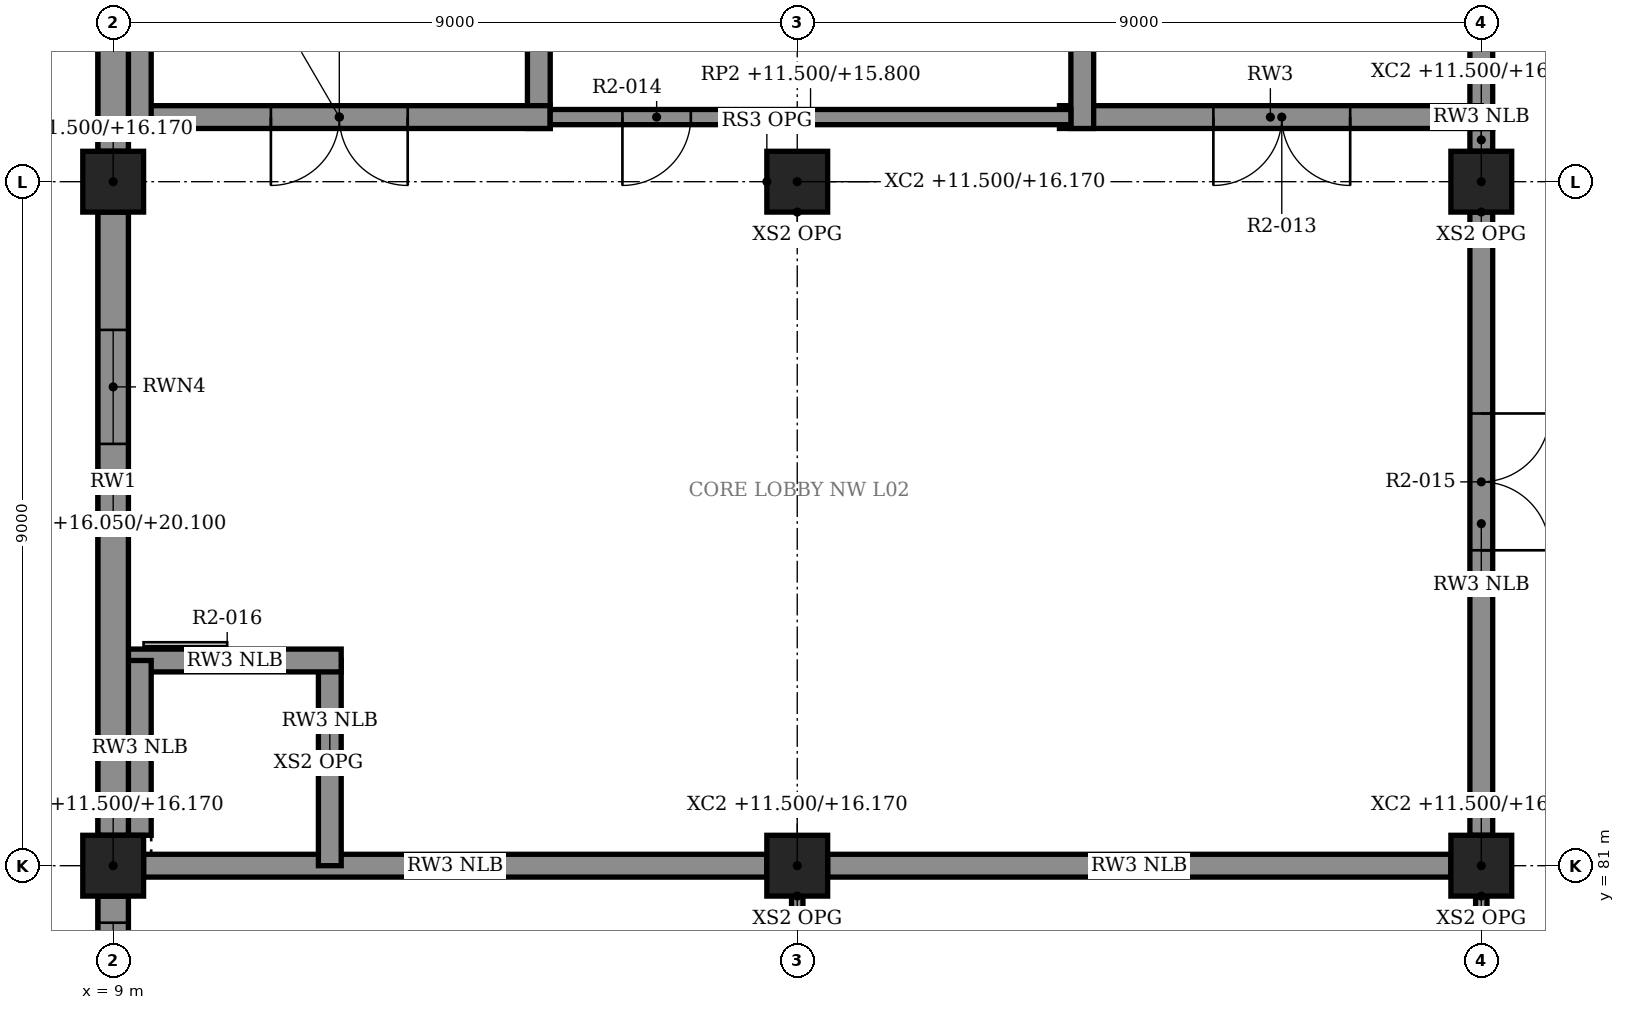
"""IFC4 building model, lengths in metres.
Left out: names, types, materials, properties, quantities, classifications, styles, units other than length and angle.
Written with IfcOpenShell. Run it as: python <this file> out.ifc"""

import sys

from ifc_helpers import new_model, si_unit, direction, frame, frame_2d, origin, origin_2d, place, context, subcontext, project, spatial, rectangle, extrude, element, fill, save


model = new_model("IFC4")
c1 = context("Model", 3, precision=1e-05, world=origin(), true_north=direction((0.0, 1.0)))
c2 = subcontext(c1, "Body", "Model", "MODEL_VIEW")
j1 = project(units=[si_unit("LENGTHUNIT", "METRE"), si_unit("PLANEANGLEUNIT", "RADIAN")], contexts=[c1])
p1 = place(None, origin())
s1 = spatial("IfcSite", under=j1, at=p1, CompositionType="ELEMENT")
p2 = place(p1, origin())
s2 = spatial("IfcBuilding", under=s1, at=p2, CompositionType="ELEMENT")
p3 = place(p2, frame((0.0, 0.0, 11.5)))
s3 = spatial("IfcBuildingStorey", under=s2, at=p3, CompositionType="ELEMENT", Elevation=11.5)
for number, where, z_axis, x_axis in (
    (1, (9.0, 81.0, 0.0), (0.0, 0.0, 1.0), (1.0, 0.0, 0.0)),
    (2, (9.0, 90.0, 0.0), (0.0, 0.0, 1.0), (1.0, 0.0, 0.0)),
    (3, (18.0, 81.0, 0.0), (0.0, 0.0, 1.0), (1.0, 0.0, 0.0)),
    (4, (18.0, 90.0, 0.0), (0.0, 0.0, 1.0), (1.0, 0.0, 0.0)),
    (5, (27.0, 81.0, 0.0), (0.0, 0.0, 1.0), (1.0, 0.0, 0.0)),
    (6, (27.0, 90.0, 0.0), (0.0, 0.0, 1.0), (1.0, 0.0, 0.0)),
):
    element("IfcColumn", number, at=place(p3, frame(where, z_axis=z_axis, x_axis=x_axis)), inside=s3, PredefinedType="COLUMN", context=c2, shape_type="SweptSolid", body=[
        extrude(rectangle(XDim=0.8, YDim=0.8, at=origin_2d()), origin(), (0.0, 0.0, 1.0), 4.67),
    ])
for number, where, z_axis, x_axis in (
    (7, (9.0, 72.0, 4.55), (0.0, 0.0, 1.0), (0.0, 1.0, 0.0)),
    (8, (9.0, 81.0, 4.55), (0.0, 0.0, 1.0), (0.0, 1.0, 0.0)),
    (9, (9.0, 90.0, 4.55), (0.0, 0.0, 1.0), (0.0, 1.0, 0.0)),
):
    element("IfcWall", number, at=place(p3, frame(where, z_axis=z_axis, x_axis=x_axis)), inside=s3, PredefinedType="SOLIDWALL", context=c2, shape_type="SweptSolid", body=[
        extrude(rectangle(XDim=9.0, YDim=0.4, at=frame_2d((4.5, 0.0))), origin(), (0.0, 0.0, 1.0), 4.05),
    ])
p4 = place(p3, frame((9.0, 72.4, 0.0), z_axis=(0.0, 0.0, 1.0), x_axis=(0.0, 1.0, 0.0)))
e10 = element("IfcWall", 10, at=p4, inside=s3, PredefinedType="SOLIDWALL", context=c2, shape_type="SweptSolid", body=[
    extrude(rectangle(XDim=8.2, YDim=0.4, at=frame_2d((4.1, 0.0))), origin(), (0.0, 0.0, 1.0), 4.55),
])
p5 = place(p4, frame((0.35, 0.0, 0.9)))
e11 = element("IfcOpeningElement", 11, at=p5, cuts=e10, PredefinedType="OPENING", context=c2, shape_type="SweptSolid", body=[
    extrude(rectangle(XDim=1.5, YDim=2.4, at=frame_2d((0.75, 1.2))), frame((0.0, 0.21, 0.0), z_axis=(0.0, -1.0, 0.0), x_axis=(1.0, 0.0, 0.0)), (0.0, 0.0, 1.0), 0.42),
])
p6 = place(p4, frame((3.35, 0.0, 0.9)))
e12 = element("IfcOpeningElement", 12, at=p6, cuts=e10, PredefinedType="OPENING", context=c2, shape_type="SweptSolid", body=[
    extrude(rectangle(XDim=1.5, YDim=2.4, at=frame_2d((0.75, 1.2))), frame((0.0, 0.21, 0.0), z_axis=(0.0, -1.0, 0.0), x_axis=(1.0, 0.0, 0.0)), (0.0, 0.0, 1.0), 0.42),
])
p7 = place(p4, frame((6.35, 0.0, 0.9)))
e13 = element("IfcOpeningElement", 13, at=p7, cuts=e10, PredefinedType="OPENING", context=c2, shape_type="SweptSolid", body=[
    extrude(rectangle(XDim=1.5, YDim=2.4, at=frame_2d((0.75, 1.2))), frame((0.0, 0.21, 0.0), z_axis=(0.0, -1.0, 0.0), x_axis=(1.0, 0.0, 0.0)), (0.0, 0.0, 1.0), 0.42),
])
p8 = place(p3, frame((9.0, 81.4, 0.0), z_axis=(0.0, 0.0, 1.0), x_axis=(0.0, 1.0, 0.0)))
e14 = element("IfcWall", 14, at=p8, inside=s3, PredefinedType="SOLIDWALL", context=c2, shape_type="SweptSolid", body=[
    extrude(rectangle(XDim=8.2, YDim=0.4, at=frame_2d((4.1, 0.0))), origin(), (0.0, 0.0, 1.0), 4.55),
])
p9 = place(p8, frame((5.15, 0.0, 1.2)))
e15 = element("IfcOpeningElement", 15, at=p9, cuts=e14, PredefinedType="OPENING", context=c2, shape_type="SweptSolid", body=[
    extrude(rectangle(XDim=1.5, YDim=1.8, at=frame_2d((0.75, 0.9))), frame((0.0, 0.21, 0.0), z_axis=(0.0, -1.0, 0.0), x_axis=(1.0, 0.0, 0.0)), (0.0, 0.0, 1.0), 0.42),
])
p10 = place(p3, frame((9.0, 90.4, 0.0), z_axis=(0.0, 0.0, 1.0), x_axis=(0.0, 1.0, 0.0)))
e16 = element("IfcWall", 16, at=p10, inside=s3, PredefinedType="SOLIDWALL", context=c2, shape_type="SweptSolid", body=[
    extrude(rectangle(XDim=8.2, YDim=0.4, at=frame_2d((4.1, 0.0))), origin(), (0.0, 0.0, 1.0), 4.55),
])
p11 = place(p3, frame((9.2, 90.85, 0.0), z_axis=(0.0, 0.0, 1.0), x_axis=(1.0, 0.0, 0.0)))
e17 = element("IfcWall", 17, at=p11, inside=s3, PredefinedType="SOLIDWALL", context=c2, shape_type="SweptSolid", body=[
    extrude(rectangle(XDim=5.55, YDim=0.3, at=frame_2d((2.775, 0.0))), origin(), (0.0, 0.0, 1.0), 4.3),
])
p12 = place(p11, frame((1.875, 0.0, 0.0)))
e18 = element("IfcOpeningElement", 18, at=p12, cuts=e17, PredefinedType="OPENING", context=c2, shape_type="SweptSolid", body=[
    extrude(rectangle(XDim=1.8, YDim=2.4, at=frame_2d((0.9, 1.2))), frame((0.0, 0.16, 0.0), z_axis=(0.0, -1.0, 0.0), x_axis=(1.0, 0.0, 0.0)), (0.0, 0.0, 1.0), 0.32),
])
p13 = place(p3, frame((9.35, 98.6, 0.0), z_axis=(0.0, 0.0, 1.0), x_axis=(0.0, -1.0, 0.0)))
e19 = element("IfcWall", 19, at=p13, inside=s3, PredefinedType="SOLIDWALL", context=c2, shape_type="SweptSolid", body=[
    extrude(rectangle(XDim=7.9, YDim=0.3, at=frame_2d((3.95, 0.0))), origin(), (0.0, 0.0, 1.0), 4.3),
])
p14 = place(p3, frame((14.6, 98.8, 0.0), z_axis=(0.0, 0.0, 1.0), x_axis=(0.0, -1.0, 0.0)))
e20 = element("IfcWall", 20, at=p14, inside=s3, PredefinedType="SOLIDWALL", context=c2, shape_type="SweptSolid", body=[
    extrude(rectangle(XDim=8.1, YDim=0.3, at=frame_2d((4.05, 0.0))), origin(), (0.0, 0.0, 1.0), 4.3),
])
p15 = place(p3, frame((21.45, 90.85, 0.0), z_axis=(0.0, 0.0, 1.0), x_axis=(1.0, 0.0, 0.0)))
e21 = element("IfcWall", 21, at=p15, inside=s3, PredefinedType="SOLIDWALL", context=c2, shape_type="SweptSolid", body=[
    extrude(rectangle(XDim=5.55, YDim=0.3, at=frame_2d((2.775, 0.0))), origin(), (0.0, 0.0, 1.0), 4.3),
])
p16 = place(p15, frame((2.025, 0.0, 0.0)))
e22 = element("IfcOpeningElement", 22, at=p16, cuts=e21, PredefinedType="OPENING", context=c2, shape_type="SweptSolid", body=[
    extrude(rectangle(XDim=1.8, YDim=2.4, at=frame_2d((0.9, 1.2))), frame((0.0, 0.16, 0.0), z_axis=(0.0, -1.0, 0.0), x_axis=(1.0, 0.0, 0.0)), (0.0, 0.0, 1.0), 0.32),
])
p17 = place(p3, frame((21.75, 98.8, 0.0), z_axis=(0.0, 0.0, 1.0), x_axis=(0.0, -1.0, 0.0)))
e23 = element("IfcWall", 23, at=p17, inside=s3, PredefinedType="SOLIDWALL", context=c2, shape_type="SweptSolid", body=[
    extrude(rectangle(XDim=8.1, YDim=0.3, at=frame_2d((4.05, 0.0))), origin(), (0.0, 0.0, 1.0), 4.3),
])
p18 = place(p3, frame((27.0, 98.6, 0.0), z_axis=(0.0, 0.0, 1.0), x_axis=(0.0, -1.0, 0.0)))
e24 = element("IfcWall", 24, at=p18, inside=s3, PredefinedType="SOLIDWALL", context=c2, shape_type="SweptSolid", body=[
    extrude(rectangle(XDim=7.9, YDim=0.3, at=frame_2d((3.95, 0.0))), origin(), (0.0, 0.0, 1.0), 4.3),
])
p19 = place(p3, frame((14.75, 90.85, 0.0), z_axis=(0.0, 0.0, 1.0), x_axis=(1.0, 0.0, 0.0)))
e25 = element("IfcWall", 25, at=p19, inside=s3, PredefinedType="PARTITIONING", context=c2, shape_type="SweptSolid", body=[
    extrude(rectangle(XDim=6.85, YDim=0.2, at=frame_2d((3.425, 0.0))), origin(), (0.0, 0.0, 1.0), 4.3),
])
p20 = place(p19, frame((0.95, 0.0, 0.0)))
e26 = element("IfcOpeningElement", 26, at=p20, cuts=e25, PredefinedType="OPENING", context=c2, shape_type="SweptSolid", body=[
    extrude(rectangle(XDim=0.9, YDim=2.1, at=frame_2d((0.45, 1.05))), frame((0.0, 0.11, 0.0), z_axis=(0.0, -1.0, 0.0), x_axis=(1.0, 0.0, 0.0)), (0.0, 0.0, 1.0), 0.22),
])
for number, where, z_axis, x_axis in (
    (27, (9.4, 81.0, 0.0), (0.0, 0.0, 1.0), (1.0, 0.0, 0.0)),
    (28, (18.4, 81.0, 0.0), (0.0, 0.0, 1.0), (1.0, 0.0, 0.0)),
):
    element("IfcWall", number, at=place(p3, frame(where, z_axis=z_axis, x_axis=x_axis)), inside=s3, PredefinedType="SOLIDWALL", context=c2, shape_type="SweptSolid", body=[
        extrude(rectangle(XDim=8.2, YDim=0.3, at=frame_2d((4.1, 0.0))), origin(), (0.0, 0.0, 1.0), 4.3),
    ])
p21 = place(p3, frame((27.0, 89.6, 0.0), z_axis=(0.0, 0.0, 1.0), x_axis=(0.0, -1.0, 0.0)))
e29 = element("IfcWall", 29, at=p21, inside=s3, PredefinedType="SOLIDWALL", context=c2, shape_type="SweptSolid", body=[
    extrude(rectangle(XDim=8.2, YDim=0.3, at=frame_2d((4.1, 0.0))), origin(), (0.0, 0.0, 1.0), 4.3),
])
p22 = place(p21, frame((2.65, 0.0, 0.0)))
e30 = element("IfcOpeningElement", 30, at=p22, cuts=e29, PredefinedType="OPENING", context=c2, shape_type="SweptSolid", body=[
    extrude(rectangle(XDim=1.8, YDim=2.4, at=frame_2d((0.9, 1.2))), frame((0.0, 0.16, 0.0), z_axis=(0.0, -1.0, 0.0), x_axis=(1.0, 0.0, 0.0)), (0.0, 0.0, 1.0), 0.32),
])
p23 = place(p3, frame((27.0, 90.7, 0.0), z_axis=(0.0, 0.0, 1.0), x_axis=(0.0, -1.0, 0.0)))
e31 = element("IfcWall", 31, at=p23, inside=s3, PredefinedType="SOLIDWALL", context=c2, shape_type="SweptSolid", body=[
    extrude(rectangle(XDim=0.3, YDim=0.3, at=frame_2d((0.15, 0.0))), origin(), (0.0, 0.0, 1.0), 4.3),
])
p24 = place(p3, frame((9.2, 83.7, 0.0), z_axis=(0.0, 0.0, 1.0), x_axis=(1.0, 0.0, 0.0)))
e32 = element("IfcWall", 32, at=p24, inside=s3, PredefinedType="SOLIDWALL", context=c2, shape_type="SweptSolid", body=[
    extrude(rectangle(XDim=2.8, YDim=0.3, at=frame_2d((1.4, 0.0))), origin(), (0.0, 0.0, 1.0), 4.3),
])
p25 = place(p24, frame((0.75, 0.0, 0.0)))
e33 = element("IfcOpeningElement", 33, at=p25, cuts=e32, PredefinedType="OPENING", context=c2, shape_type="SweptSolid", body=[
    extrude(rectangle(XDim=1.1, YDim=2.4, at=frame_2d((0.55, 1.2))), frame((0.0, 0.16, 0.0), z_axis=(0.0, -1.0, 0.0), x_axis=(1.0, 0.0, 0.0)), (0.0, 0.0, 1.0), 0.32),
])
p26 = place(p3, frame((11.85, 83.7, 0.0), z_axis=(0.0, 0.0, 1.0), x_axis=(0.0, -1.0, 0.0)))
e34 = element("IfcWall", 34, at=p26, inside=s3, PredefinedType="SOLIDWALL", context=c2, shape_type="SweptSolid", body=[
    extrude(rectangle(XDim=2.7, YDim=0.3, at=frame_2d((1.35, 0.0))), origin(), (0.0, 0.0, 1.0), 4.3),
])
p27 = place(p3, frame((9.35, 83.7, 0.0), z_axis=(0.0, 0.0, 1.0), x_axis=(0.0, -1.0, 0.0)))
e35 = element("IfcWall", 35, at=p27, inside=s3, PredefinedType="SOLIDWALL", context=c2, shape_type="SweptSolid", body=[
    extrude(rectangle(XDim=2.3, YDim=0.3, at=frame_2d((1.15, 0.0))), origin(), (0.0, 0.0, 1.0), 4.3),
])
for number, where, z_axis, x_axis in (
    (36, (18.0, 72.4, 0.0), (0.0, 0.0, 1.0), (0.0, 1.0, 0.0)),
    (37, (27.0, 72.4, 0.0), (0.0, 0.0, 1.0), (0.0, 1.0, 0.0)),
):
    element("IfcWall", number, at=place(p3, frame(where, z_axis=z_axis, x_axis=x_axis)), inside=s3, PredefinedType="PARTITIONING", context=c2, shape_type="SweptSolid", body=[
        extrude(rectangle(XDim=8.2, YDim=0.15, at=frame_2d((4.1, 0.0))), origin(), (0.0, 0.0, 1.0), 4.55),
    ])
p28 = place(p7, origin())
e38 = element("IfcWindow", 38, at=p28, inside=s3, PartitioningType="SINGLE_PANEL", PredefinedType="WINDOW", context=c2, shape_type="SweptSolid", body=[
    extrude(rectangle(XDim=1.5, YDim=2.4, at=frame_2d((0.75, 1.2))), frame((0.0, 0.03, 0.0), z_axis=(0.0, -1.0, 0.0), x_axis=(1.0, 0.0, 0.0)), (0.0, 0.0, 1.0), 0.06),
])
fill(e13, e38)
p29 = place(p9, origin())
e39 = element("IfcWindow", 39, at=p29, inside=s3, PartitioningType="SINGLE_PANEL", PredefinedType="WINDOW", context=c2, shape_type="SweptSolid", body=[
    extrude(rectangle(XDim=1.5, YDim=1.8, at=frame_2d((0.75, 0.9))), frame((0.0, 0.03, 0.0), z_axis=(0.0, -1.0, 0.0), x_axis=(1.0, 0.0, 0.0)), (0.0, 0.0, 1.0), 0.06),
])
fill(e15, e39)
p30 = place(p12, frame((1.8, 0.0, 0.0), z_axis=(0.0, 0.0, 1.0), x_axis=(-1.0, 0.0, 0.0)))
e40 = element("IfcDoor", 40, at=p30, inside=s3, OperationType="DOUBLE_DOOR_SINGLE_SWING", PredefinedType="DOOR", context=c2, shape_type="SweptSolid", body=[
    extrude(rectangle(XDim=1.8, YDim=2.4, at=frame_2d((0.9, 1.2))), frame((0.0, 0.025, 0.0), z_axis=(0.0, -1.0, 0.0), x_axis=(1.0, 0.0, 0.0)), (0.0, 0.0, 1.0), 0.05),
])
fill(e18, e40)
p31 = place(p16, frame((1.8, 0.0, 0.0), z_axis=(0.0, 0.0, 1.0), x_axis=(-1.0, 0.0, 0.0)))
e41 = element("IfcDoor", 41, at=p31, inside=s3, OperationType="DOUBLE_DOOR_SINGLE_SWING", PredefinedType="DOOR", context=c2, shape_type="SweptSolid", body=[
    extrude(rectangle(XDim=1.8, YDim=2.4, at=frame_2d((0.9, 1.2))), frame((0.0, 0.025, 0.0), z_axis=(0.0, -1.0, 0.0), x_axis=(1.0, 0.0, 0.0)), (0.0, 0.0, 1.0), 0.05),
])
fill(e22, e41)
p32 = place(p20, frame((0.9, 0.0, 0.0), z_axis=(0.0, 0.0, 1.0), x_axis=(-1.0, 0.0, 0.0)))
e42 = element("IfcDoor", 42, at=p32, inside=s3, OperationType="SINGLE_SWING_LEFT", PredefinedType="DOOR", context=c2, shape_type="SweptSolid", body=[
    extrude(rectangle(XDim=0.9, YDim=2.1, at=frame_2d((0.45, 1.05))), frame((0.0, 0.025, 0.0), z_axis=(0.0, -1.0, 0.0), x_axis=(1.0, 0.0, 0.0)), (0.0, 0.0, 1.0), 0.05),
])
fill(e26, e42)
p33 = place(p22, origin())
e43 = element("IfcDoor", 43, at=p33, inside=s3, OperationType="DOUBLE_DOOR_SINGLE_SWING", PredefinedType="DOOR", context=c2, shape_type="SweptSolid", body=[
    extrude(rectangle(XDim=1.8, YDim=2.4, at=frame_2d((0.9, 1.2))), frame((0.0, 0.025, 0.0), z_axis=(0.0, -1.0, 0.0), x_axis=(1.0, 0.0, 0.0)), (0.0, 0.0, 1.0), 0.05),
])
fill(e30, e43)
p34 = place(p25, origin())
e44 = element("IfcDoor", 44, at=p34, inside=s3, OperationType="SLIDING_TO_LEFT", PredefinedType="DOOR", context=c2, shape_type="SweptSolid", body=[
    extrude(rectangle(XDim=1.1, YDim=2.4, at=frame_2d((0.55, 1.2))), frame((0.0, 0.025, 0.0), z_axis=(0.0, -1.0, 0.0), x_axis=(1.0, 0.0, 0.0)), (0.0, 0.0, 1.0), 0.05),
])
fill(e33, e44)
save(model, sys.argv[1])
